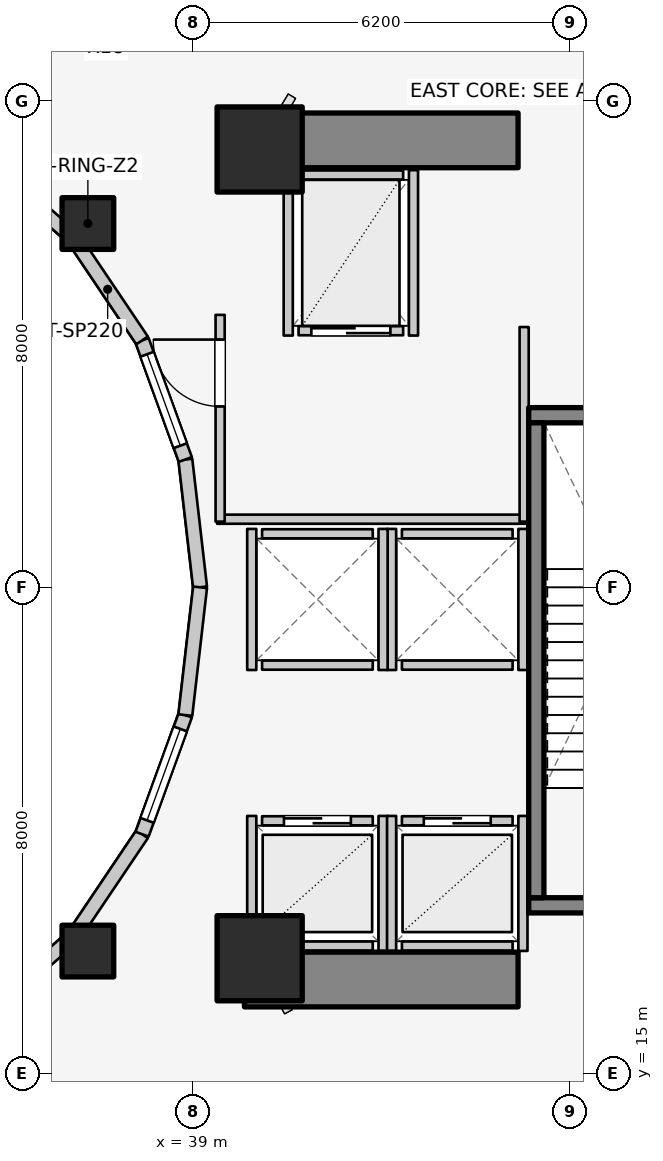
"""IFC4 building model, lengths in metres.
Left out: names, types, materials, properties, quantities, classifications, styles, units other than length and angle.
Written with IfcOpenShell. Run it as: python <this file> out.ifc"""

import sys

from ifc_helpers import new_model, si_unit, direction, frame, frame_2d, origin, origin_2d, place, context, subcontext, project, spatial, rectangle, extrude, element, fill, save


model = new_model("IFC4")
c1 = context("Model", 3, precision=1e-05, world=origin(), true_north=direction((0.0, 1.0)))
c2 = subcontext(c1, "Body", "Model", "MODEL_VIEW")
j1 = project(units=[si_unit("LENGTHUNIT", "METRE"), si_unit("PLANEANGLEUNIT", "RADIAN")], contexts=[c1])
p1 = place(None, origin())
s1 = spatial("IfcSite", under=j1, at=p1, CompositionType="ELEMENT")
p2 = place(p1, origin())
s2 = spatial("IfcBuilding", under=s1, at=p2, CompositionType="ELEMENT")
p3 = place(p2, frame((0.0, 0.0, 64.8)))
s3 = spatial("IfcBuildingStorey", under=s2, at=p3, CompositionType="ELEMENT", Elevation=64.8)
for number, where, z_axis, x_axis in (
    (1, (39.85, 16.55, 0.0), (0.0, 0.0, 1.0), (1.0, 0.0, 0.0)),
    (2, (39.85, 30.35, 0.0), (0.0, 0.0, 1.0), (1.0, 0.0, 0.0)),
):
    element("IfcWall", number, at=place(p3, frame(where, z_axis=z_axis, x_axis=x_axis)), inside=s3, PredefinedType="SHEAR", context=c2, shape_type="SweptSolid", body=[
        extrude(rectangle(XDim=4.5, YDim=0.9, at=frame_2d((2.25, 0.0))), origin(), (0.0, 0.0, 1.0), 4.2),
    ])
p4 = place(p3, frame((44.525, 17.77, 0.0), z_axis=(0.0, 0.0, 1.0), x_axis=(1.0, 0.0, 0.0)))
e3 = element("IfcWall", 3, at=p4, inside=s3, PredefinedType="SOLIDWALL", context=c2, shape_type="SweptSolid", body=[
    extrude(rectangle(XDim=3.37, YDim=0.25, at=frame_2d((1.685, 0.0))), origin(), (0.0, 0.0, 1.0), 4.2),
])
p5 = place(p4, frame((1.135, 0.0, 0.0)))
e4 = element("IfcOpeningElement", 4, at=p5, cuts=e3, PredefinedType="OPENING", context=c2, shape_type="SweptSolid", body=[
    extrude(rectangle(XDim=1.1, YDim=2.1, at=frame_2d((0.55, 1.05))), frame((0.0, 0.135, 0.0), z_axis=(0.0, -1.0, 0.0), x_axis=(1.0, 0.0, 0.0)), (0.0, 0.0, 1.0), 0.27),
])
p6 = place(p3, frame((44.525, 25.83, 0.0), z_axis=(0.0, 0.0, 1.0), x_axis=(1.0, 0.0, 0.0)))
e5 = element("IfcWall", 5, at=p6, inside=s3, PredefinedType="SOLIDWALL", context=c2, shape_type="SweptSolid", body=[
    extrude(rectangle(XDim=3.37, YDim=0.25, at=frame_2d((1.685, 0.0))), origin(), (0.0, 0.0, 1.0), 4.2),
])
p7 = place(p3, frame((44.65, 17.895, 0.0), z_axis=(0.0, 0.0, 1.0), x_axis=(0.0, 1.0, 0.0)))
e6 = element("IfcWall", 6, at=p7, inside=s3, PredefinedType="SOLIDWALL", context=c2, shape_type="SweptSolid", body=[
    extrude(rectangle(XDim=7.81, YDim=0.25, at=frame_2d((3.905, 0.0))), origin(), (0.0, 0.0, 1.0), 4.2),
])
for number, where, z_axis, x_axis in (
    (7, (40.1, 16.9, 0.0), (0.0, 0.0, 1.0), (1.0, 0.0, 0.0)),
    (8, (40.1, 30.2, 0.0), (0.0, 0.0, 1.0), (1.0, 0.0, 0.0)),
):
    element("IfcColumn", number, at=place(p3, frame(where, z_axis=z_axis, x_axis=x_axis)), inside=s3, PredefinedType="COLUMN", context=c2, shape_type="SweptSolid", body=[
        extrude(rectangle(XDim=1.4, YDim=1.4, at=origin_2d()), origin(), (0.0, 0.0, 1.0), 4.2),
    ])
for number, where, z_axis, x_axis in (
    (9, (37.275, 28.982, 0.0), (0.0, 0.0, 1.0), (1.0, 0.0, 0.0)),
    (10, (37.275, 17.018, 0.0), (0.0, 0.0, 1.0), (1.0, 0.0, 0.0)),
):
    element("IfcColumn", number, at=place(p3, frame(where, z_axis=z_axis, x_axis=x_axis)), inside=s3, PredefinedType="COLUMN", context=c2, shape_type="SweptSolid", body=[
        extrude(rectangle(XDim=0.85, YDim=0.85, at=origin_2d()), origin(), (0.0, 0.0, 1.0), 4.2),
    ])
p8 = place(p3, frame((39.12, 23.0, 0.0), z_axis=(0.0, 0.0, 1.0), x_axis=(-0.114711713601, 0.993398823617, 0.0)))
e11 = element("IfcWall", 11, at=p8, inside=s3, PredefinedType="STANDARD", context=c2, shape_type="SweptSolid", body=[
    extrude(rectangle(XDim=2.115, YDim=0.23, at=frame_2d((1.058, 0.0))), origin(), (0.0, 0.0, 1.0), 2.8),
])
p9 = place(p3, frame((38.877, 25.102, 0.0), z_axis=(0.0, 0.0, 1.0), x_axis=(-0.341423187295, 0.93990968033, 0.0)))
e12 = element("IfcWall", 12, at=p9, inside=s3, PredefinedType="STANDARD", context=c2, shape_type="SweptSolid", body=[
    extrude(rectangle(XDim=2.084, YDim=0.23, at=frame_2d((1.042, 0.0))), origin(), (0.0, 0.0, 1.0), 2.8),
])
p10 = place(p9, frame((0.242, 0.0, 0.85)))
e13 = element("IfcOpeningElement", 13, at=p10, cuts=e12, PredefinedType="OPENING", context=c2, shape_type="SweptSolid", body=[
    extrude(rectangle(XDim=1.6, YDim=1.65, at=frame_2d((0.8, 0.825))), frame((0.0, 0.125, 0.0), z_axis=(0.0, -1.0, 0.0), x_axis=(1.0, 0.0, 0.0)), (0.0, 0.0, 1.0), 0.25),
])
p11 = place(p3, frame((38.166, 27.06, 0.0), z_axis=(0.0, 0.0, 1.0), x_axis=(-0.558197800898, 0.829707909492, 0.0)))
e14 = element("IfcWall", 14, at=p11, inside=s3, PredefinedType="STANDARD", context=c2, shape_type="SweptSolid", body=[
    extrude(rectangle(XDim=2.027, YDim=0.23, at=frame_2d((1.013, 0.0))), origin(), (0.0, 0.0, 1.0), 2.32),
])
for number, where, z_axis, x_axis in (
    (15, (37.035, 28.742, 0.0), (0.0, 0.0, 1.0), (-0.753, 0.659, 0.0)),
    (16, (35.56, 15.968, 0.0), (0.0, 0.0, 1.0), (0.753, 0.659, 0.0)),
):
    element("IfcWall", number, at=place(p3, frame(where, z_axis=z_axis, x_axis=x_axis)), inside=s3, PredefinedType="STANDARD", context=c2, shape_type="SweptSolid", body=[
        extrude(rectangle(XDim=1.959, YDim=0.23, at=frame_2d((0.98, 0.0))), origin(), (0.0, 0.0, 1.0), 2.32),
    ])
p12 = place(p3, frame((37.035, 17.258, 0.0), z_axis=(0.0, 0.0, 1.0), x_axis=(0.558197800898, 0.829707909492, 0.0)))
e17 = element("IfcWall", 17, at=p12, inside=s3, PredefinedType="STANDARD", context=c2, shape_type="SweptSolid", body=[
    extrude(rectangle(XDim=2.027, YDim=0.23, at=frame_2d((1.013, 0.0))), origin(), (0.0, 0.0, 1.0), 2.32),
])
p13 = place(p3, frame((38.166, 18.94, 0.0), z_axis=(0.0, 0.0, 1.0), x_axis=(0.341423187295, 0.93990968033, 0.0)))
e18 = element("IfcWall", 18, at=p13, inside=s3, PredefinedType="STANDARD", context=c2, shape_type="SweptSolid", body=[
    extrude(rectangle(XDim=2.084, YDim=0.23, at=frame_2d((1.042, 0.0))), origin(), (0.0, 0.0, 1.0), 2.8),
])
p14 = place(p13, frame((0.242, 0.0, 0.85)))
e19 = element("IfcOpeningElement", 19, at=p14, cuts=e18, PredefinedType="OPENING", context=c2, shape_type="SweptSolid", body=[
    extrude(rectangle(XDim=1.6, YDim=1.65, at=frame_2d((0.8, 0.825))), frame((0.0, 0.125, 0.0), z_axis=(0.0, -1.0, 0.0), x_axis=(1.0, 0.0, 0.0)), (0.0, 0.0, 1.0), 0.25),
])
p15 = place(p3, frame((38.877, 20.898, 0.0), z_axis=(0.0, 0.0, 1.0), x_axis=(0.114711713601, 0.993398823617, 0.0)))
e20 = element("IfcWall", 20, at=p15, inside=s3, PredefinedType="STANDARD", context=c2, shape_type="SweptSolid", body=[
    extrude(rectangle(XDim=2.115, YDim=0.23, at=frame_2d((1.058, 0.0))), origin(), (0.0, 0.0, 1.0), 2.8),
])
p16 = place(p3, frame((40.14, 19.16, 0.0), z_axis=(0.0, 0.0, 1.0), x_axis=(1.0, 0.0, 0.0)))
e21 = element("IfcWall", 21, at=p16, inside=s3, PredefinedType="SOLIDWALL", context=c2, shape_type="SweptSolid", body=[
    extrude(rectangle(XDim=1.82, YDim=0.15, at=frame_2d((0.91, 0.0))), origin(), (0.0, 0.0, 1.0), 3.22),
])
p17 = place(p16, frame((0.36, 0.0, 0.0)))
e22 = element("IfcOpeningElement", 22, at=p17, cuts=e21, PredefinedType="OPENING", context=c2, shape_type="SweptSolid", body=[
    extrude(rectangle(XDim=1.1, YDim=2.1, at=frame_2d((0.55, 1.05))), frame((0.0, 0.085, 0.0), z_axis=(0.0, -1.0, 0.0), x_axis=(1.0, 0.0, 0.0)), (0.0, 0.0, 1.0), 0.17),
])
p18 = place(p3, frame((40.14, 17.1, 0.0), z_axis=(0.0, 0.0, 1.0), x_axis=(1.0, 0.0, 0.0)))
e23 = element("IfcWall", 23, at=p18, inside=s3, PredefinedType="SOLIDWALL", context=c2, shape_type="SweptSolid", body=[
    extrude(rectangle(XDim=1.82, YDim=0.15, at=frame_2d((0.91, 0.0))), origin(), (0.0, 0.0, 1.0), 3.22),
])
p19 = place(p3, frame((39.97, 17.02, 0.0), z_axis=(0.0, 0.0, 1.0), x_axis=(0.0, 1.0, 0.0)))
e24 = element("IfcWall", 24, at=p19, inside=s3, PredefinedType="SOLIDWALL", context=c2, shape_type="SweptSolid", body=[
    extrude(rectangle(XDim=2.22, YDim=0.15, at=frame_2d((1.11, 0.0))), origin(), (0.0, 0.0, 1.0), 2.973),
])
p20 = place(p3, frame((42.13, 17.02, 0.0), z_axis=(0.0, 0.0, 1.0), x_axis=(0.0, 1.0, 0.0)))
e25 = element("IfcWall", 25, at=p20, inside=s3, PredefinedType="SOLIDWALL", context=c2, shape_type="SweptSolid", body=[
    extrude(rectangle(XDim=2.22, YDim=0.15, at=frame_2d((1.11, 0.0))), origin(), (0.0, 0.0, 1.0), 3.675),
])
p21 = place(p3, frame((42.44, 19.16, 0.0), z_axis=(0.0, 0.0, 1.0), x_axis=(1.0, 0.0, 0.0)))
e26 = element("IfcWall", 26, at=p21, inside=s3, PredefinedType="SOLIDWALL", context=c2, shape_type="SweptSolid", body=[
    extrude(rectangle(XDim=1.82, YDim=0.15, at=frame_2d((0.91, 0.0))), origin(), (0.0, 0.0, 1.0), 3.675),
])
p22 = place(p21, frame((0.36, 0.0, 0.0)))
e27 = element("IfcOpeningElement", 27, at=p22, cuts=e26, PredefinedType="OPENING", context=c2, shape_type="SweptSolid", body=[
    extrude(rectangle(XDim=1.1, YDim=2.1, at=frame_2d((0.55, 1.05))), frame((0.0, 0.085, 0.0), z_axis=(0.0, -1.0, 0.0), x_axis=(1.0, 0.0, 0.0)), (0.0, 0.0, 1.0), 0.17),
])
p23 = place(p3, frame((42.44, 17.1, 0.0), z_axis=(0.0, 0.0, 1.0), x_axis=(1.0, 0.0, 0.0)))
e28 = element("IfcWall", 28, at=p23, inside=s3, PredefinedType="SOLIDWALL", context=c2, shape_type="SweptSolid", body=[
    extrude(rectangle(XDim=1.82, YDim=0.15, at=frame_2d((0.91, 0.0))), origin(), (0.0, 0.0, 1.0), 3.675),
])
p24 = place(p3, frame((42.27, 17.02, 0.0), z_axis=(0.0, 0.0, 1.0), x_axis=(0.0, 1.0, 0.0)))
e29 = element("IfcWall", 29, at=p24, inside=s3, PredefinedType="SOLIDWALL", context=c2, shape_type="SweptSolid", body=[
    extrude(rectangle(XDim=2.22, YDim=0.15, at=frame_2d((1.11, 0.0))), origin(), (0.0, 0.0, 1.0), 3.675),
])
p25 = place(p3, frame((44.43, 17.02, 0.0), z_axis=(0.0, 0.0, 1.0), x_axis=(0.0, 1.0, 0.0)))
e30 = element("IfcWall", 30, at=p25, inside=s3, PredefinedType="SOLIDWALL", context=c2, shape_type="SweptSolid", body=[
    extrude(rectangle(XDim=2.22, YDim=0.15, at=frame_2d((1.11, 0.0))), origin(), (0.0, 0.0, 1.0), 3.22),
])
for number, where, z_axis, x_axis in (
    (31, (42.44, 21.72, 0.0), (0.0, 0.0, 1.0), (1.0, 0.0, 0.0)),
    (32, (42.44, 23.88, 0.0), (0.0, 0.0, 1.0), (1.0, 0.0, 0.0)),
):
    element("IfcWall", number, at=place(p3, frame(where, z_axis=z_axis, x_axis=x_axis)), inside=s3, PredefinedType="SOLIDWALL", context=c2, shape_type="SweptSolid", body=[
        extrude(rectangle(XDim=1.82, YDim=0.15, at=frame_2d((0.91, 0.0))), origin(), (0.0, 0.0, 1.0), 3.675),
    ])
for number, where, z_axis, x_axis in (
    (33, (42.27, 21.64, 0.0), (0.0, 0.0, 1.0), (0.0, 1.0, 0.0)),
    (34, (44.43, 21.64, 0.0), (0.0, 0.0, 1.0), (0.0, 1.0, 0.0)),
):
    element("IfcWall", number, at=place(p3, frame(where, z_axis=z_axis, x_axis=x_axis)), inside=s3, PredefinedType="SOLIDWALL", context=c2, shape_type="SweptSolid", body=[
        extrude(rectangle(XDim=2.32, YDim=0.15, at=frame_2d((1.16, 0.0))), origin(), (0.0, 0.0, 1.0), 3.675),
    ])
for number, where, z_axis, x_axis in (
    (35, (40.14, 21.72, 0.0), (0.0, 0.0, 1.0), (1.0, 0.0, 0.0)),
    (36, (40.14, 23.88, 0.0), (0.0, 0.0, 1.0), (1.0, 0.0, 0.0)),
):
    element("IfcWall", number, at=place(p3, frame(where, z_axis=z_axis, x_axis=x_axis)), inside=s3, PredefinedType="SOLIDWALL", context=c2, shape_type="SweptSolid", body=[
        extrude(rectangle(XDim=1.82, YDim=0.15, at=frame_2d((0.91, 0.0))), origin(), (0.0, 0.0, 1.0), 3.22),
    ])
p26 = place(p3, frame((39.97, 21.64, 0.0), z_axis=(0.0, 0.0, 1.0), x_axis=(0.0, 1.0, 0.0)))
e37 = element("IfcWall", 37, at=p26, inside=s3, PredefinedType="SOLIDWALL", context=c2, shape_type="SweptSolid", body=[
    extrude(rectangle(XDim=2.32, YDim=0.15, at=frame_2d((1.16, 0.0))), origin(), (0.0, 0.0, 1.0), 3.22),
])
p27 = place(p3, frame((42.13, 21.64, 0.0), z_axis=(0.0, 0.0, 1.0), x_axis=(0.0, 1.0, 0.0)))
e38 = element("IfcWall", 38, at=p27, inside=s3, PredefinedType="SOLIDWALL", context=c2, shape_type="SweptSolid", body=[
    extrude(rectangle(XDim=2.32, YDim=0.15, at=frame_2d((1.16, 0.0))), origin(), (0.0, 0.0, 1.0), 3.675),
])
p28 = place(p3, frame((40.74, 27.22, 0.0), z_axis=(0.0, 0.0, 1.0), x_axis=(1.0, 0.0, 0.0)))
e39 = element("IfcWall", 39, at=p28, inside=s3, PredefinedType="SOLIDWALL", context=c2, shape_type="SweptSolid", body=[
    extrude(rectangle(XDim=1.72, YDim=0.15, at=frame_2d((0.86, 0.0))), origin(), (0.0, 0.0, 1.0), 3.675),
])
p29 = place(p28, frame((0.21, 0.0, 0.0)))
e40 = element("IfcOpeningElement", 40, at=p29, cuts=e39, PredefinedType="OPENING", context=c2, shape_type="SweptSolid", body=[
    extrude(rectangle(XDim=1.3, YDim=2.1, at=frame_2d((0.65, 1.05))), frame((0.0, 0.085, 0.0), z_axis=(0.0, -1.0, 0.0), x_axis=(1.0, 0.0, 0.0)), (0.0, 0.0, 1.0), 0.17),
])
p30 = place(p3, frame((40.74, 29.78, 0.0), z_axis=(0.0, 0.0, 1.0), x_axis=(1.0, 0.0, 0.0)))
e41 = element("IfcWall", 41, at=p30, inside=s3, PredefinedType="SOLIDWALL", context=c2, shape_type="SweptSolid", body=[
    extrude(rectangle(XDim=1.72, YDim=0.15, at=frame_2d((0.86, 0.0))), origin(), (0.0, 0.0, 1.0), 3.675),
])
for number, where, z_axis, x_axis in (
    (42, (40.57, 27.14, 0.0), (0.0, 0.0, 1.0), (0.0, 1.0, 0.0)),
    (43, (42.63, 27.14, 0.0), (0.0, 0.0, 1.0), (0.0, 1.0, 0.0)),
):
    element("IfcWall", number, at=place(p3, frame(where, z_axis=z_axis, x_axis=x_axis)), inside=s3, PredefinedType="SOLIDWALL", context=c2, shape_type="SweptSolid", body=[
        extrude(rectangle(XDim=2.72, YDim=0.15, at=frame_2d((1.36, 0.0))), origin(), (0.0, 0.0, 1.0), 3.675),
    ])
p31 = place(p3, frame((39.4, 24.12, 0.0), z_axis=(0.0, 0.0, 1.0), x_axis=(1.0, 0.0, 0.0)))
e44 = element("IfcWall", 44, at=p31, inside=s3, PredefinedType="PARTITIONING", context=c2, shape_type="SweptSolid", body=[
    extrude(rectangle(XDim=5.08, YDim=0.15, at=frame_2d((2.54, 0.0))), origin(), (0.0, 0.0, 1.0), 3.22),
])
p32 = place(p3, frame((44.45, 24.08, 0.0), z_axis=(0.0, 0.0, 1.0), x_axis=(0.0, 1.0, 0.0)))
e45 = element("IfcWall", 45, at=p32, inside=s3, PredefinedType="PARTITIONING", context=c2, shape_type="SweptSolid", body=[
    extrude(rectangle(XDim=3.2, YDim=0.15, at=frame_2d((1.6, 0.0))), origin(), (0.0, 0.0, 1.0), 3.675),
])
p33 = place(p3, frame((39.45, 24.08, 0.0), z_axis=(0.0, 0.0, 1.0), x_axis=(0.0, 1.0, 0.0)))
e46 = element("IfcWall", 46, at=p33, inside=s3, PredefinedType="PARTITIONING", context=c2, shape_type="SweptSolid", body=[
    extrude(rectangle(XDim=3.4, YDim=0.15, at=frame_2d((1.7, 0.0))), origin(), (0.0, 0.0, 1.0), 3.675),
])
p34 = place(p33, frame((1.894, 0.0, 0.0)))
e47 = element("IfcOpeningElement", 47, at=p34, cuts=e46, PredefinedType="OPENING", context=c2, shape_type="SweptSolid", body=[
    extrude(rectangle(XDim=1.1, YDim=2.1, at=frame_2d((0.55, 1.05))), frame((0.0, 0.085, 0.0), z_axis=(0.0, -1.0, 0.0), x_axis=(1.0, 0.0, 0.0)), (0.0, 0.0, 1.0), 0.17),
])
p35 = place(p10, origin())
e48 = element("IfcWindow", 48, at=p35, inside=s3, PartitioningType="SINGLE_PANEL", PredefinedType="WINDOW", context=c2, shape_type="SweptSolid", body=[
    extrude(rectangle(XDim=1.6, YDim=1.65, at=frame_2d((0.8, 0.825))), frame((0.0, 0.03, 0.0), z_axis=(0.0, -1.0, 0.0), x_axis=(1.0, 0.0, 0.0)), (0.0, 0.0, 1.0), 0.06),
])
fill(e13, e48)
p36 = place(p14, origin())
e49 = element("IfcWindow", 49, at=p36, inside=s3, PartitioningType="SINGLE_PANEL", PredefinedType="WINDOW", context=c2, shape_type="SweptSolid", body=[
    extrude(rectangle(XDim=1.6, YDim=1.65, at=frame_2d((0.8, 0.825))), frame((0.0, 0.03, 0.0), z_axis=(0.0, -1.0, 0.0), x_axis=(1.0, 0.0, 0.0)), (0.0, 0.0, 1.0), 0.06),
])
fill(e19, e49)
p37 = place(p17, origin())
e50 = element("IfcDoor", 50, at=p37, inside=s3, OperationType="DOUBLE_DOOR_SLIDING", PredefinedType="DOOR", context=c2, shape_type="SweptSolid", body=[
    extrude(rectangle(XDim=1.1, YDim=2.1, at=frame_2d((0.55, 1.05))), frame((0.0, 0.025, 0.0), z_axis=(0.0, -1.0, 0.0), x_axis=(1.0, 0.0, 0.0)), (0.0, 0.0, 1.0), 0.05),
])
fill(e22, e50)
p38 = place(p22, origin())
e51 = element("IfcDoor", 51, at=p38, inside=s3, OperationType="DOUBLE_DOOR_SLIDING", PredefinedType="DOOR", context=c2, shape_type="SweptSolid", body=[
    extrude(rectangle(XDim=1.1, YDim=2.1, at=frame_2d((0.55, 1.05))), frame((0.0, 0.025, 0.0), z_axis=(0.0, -1.0, 0.0), x_axis=(1.0, 0.0, 0.0)), (0.0, 0.0, 1.0), 0.05),
])
fill(e27, e51)
p39 = place(p29, origin())
e52 = element("IfcDoor", 52, at=p39, inside=s3, OperationType="DOUBLE_DOOR_SLIDING", PredefinedType="DOOR", context=c2, shape_type="SweptSolid", body=[
    extrude(rectangle(XDim=1.3, YDim=2.1, at=frame_2d((0.65, 1.05))), frame((0.0, 0.025, 0.0), z_axis=(0.0, -1.0, 0.0), x_axis=(1.0, 0.0, 0.0)), (0.0, 0.0, 1.0), 0.05),
])
fill(e40, e52)
p40 = place(p34, origin())
e53 = element("IfcDoor", 53, at=p40, inside=s3, OperationType="SINGLE_SWING_RIGHT", PredefinedType="DOOR", context=c2, shape_type="SweptSolid", body=[
    extrude(rectangle(XDim=1.1, YDim=2.1, at=frame_2d((0.55, 1.05))), frame((0.0, 0.025, 0.0), z_axis=(0.0, -1.0, 0.0), x_axis=(1.0, 0.0, 0.0)), (0.0, 0.0, 1.0), 0.05),
])
fill(e47, e53)
save(model, sys.argv[1])
